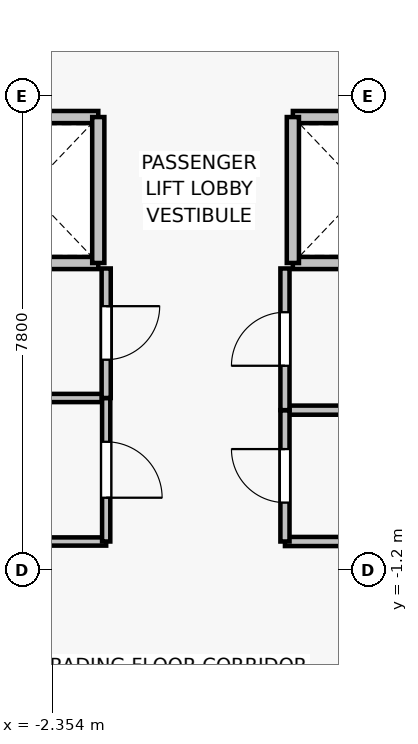
"""IFC4 building model, lengths in metres.
Left out: names, types, materials, properties, quantities, classifications, styles, units other than length and angle.
Written with IfcOpenShell. Run it as: python <this file> out.ifc"""

import sys

from ifc_helpers import new_model, si_unit, direction, frame, frame_2d, origin, place, context, subcontext, project, spatial, rectangle, extrude, source, transform, mapped, element, fill, save


model = new_model("IFC4")
c1 = context("Model", 3, precision=1e-05, world=origin(), true_north=direction((0.0, 1.0)))
c2 = subcontext(c1, "Body", "Model", "MODEL_VIEW")
j1 = project(units=[si_unit("LENGTHUNIT", "METRE"), si_unit("PLANEANGLEUNIT", "RADIAN")], contexts=[c1])
p1 = place(None, origin())
s1 = spatial("IfcSite", under=j1, at=p1, CompositionType="ELEMENT")
p2 = place(p1, origin())
s2 = spatial("IfcBuilding", under=s1, at=p2, CompositionType="ELEMENT")
p3 = place(p2, frame((0.0, 0.0, 47.2)))
s3 = spatial("IfcBuildingStorey", under=s2, at=p3, CompositionType="ELEMENT", Elevation=47.2)
for number, where, z_axis, x_axis in (
    (1, (-1.6, 3.85, 0.0), (0.0, 0.0, 1.0), (-1.0, 0.0, 0.0)),
    (2, (-3.9, 6.25, 0.0), (0.0, 0.0, 1.0), (1.0, 0.0, 0.0)),
):
    element("IfcWall", number, at=place(p3, frame(where, z_axis=z_axis, x_axis=x_axis)), inside=s3, PredefinedType="SOLIDWALL", context=c2, shape_type="SweptSolid", body=[
        extrude(rectangle(XDim=2.3, YDim=0.2, at=frame_2d((1.15, 0.0))), origin(), (0.0, 0.0, 1.0), 3.075),
    ])
p4 = place(p3, frame((-1.6, 6.25, 0.0), z_axis=(0.0, 0.0, 1.0), x_axis=(0.0, -1.0, 0.0)))
e3 = element("IfcWall", 3, at=p4, inside=s3, PredefinedType="SOLIDWALL", context=c2, shape_type="SweptSolid", body=[
    extrude(rectangle(XDim=2.4, YDim=0.2, at=frame_2d((1.2, 0.0))), origin(), (0.0, 0.0, 1.0), 3.075),
])
for number, where, z_axis, x_axis in (
    (4, (3.9, 3.85, 0.0), (0.0, 0.0, 1.0), (-1.0, 0.0, 0.0)),
    (5, (1.6, 6.25, 0.0), (0.0, 0.0, 1.0), (1.0, 0.0, 0.0)),
):
    element("IfcWall", number, at=place(p3, frame(where, z_axis=z_axis, x_axis=x_axis)), inside=s3, PredefinedType="SOLIDWALL", context=c2, shape_type="SweptSolid", body=[
        extrude(rectangle(XDim=2.3, YDim=0.2, at=frame_2d((1.15, 0.0))), origin(), (0.0, 0.0, 1.0), 3.075),
    ])
p5 = place(p3, frame((1.6, 3.85, 0.0), z_axis=(0.0, 0.0, 1.0), x_axis=(0.0, 1.0, 0.0)))
e6 = element("IfcWall", 6, at=p5, inside=s3, PredefinedType="SOLIDWALL", context=c2, shape_type="SweptSolid", body=[
    extrude(rectangle(XDim=2.4, YDim=0.2, at=frame_2d((1.2, 0.0))), origin(), (0.0, 0.0, 1.0), 3.075),
])
for number, where, z_axis, x_axis in (
    (7, (-1.47, -0.73, 0.0), (0.0, 0.0, 1.0), (-1.0, 0.0, 0.0)),
    (8, (-3.47, 1.63, 0.0), (0.0, 0.0, 1.0), (1.0, 0.0, 0.0)),
):
    element("IfcWall", number, at=place(p3, frame(where, z_axis=z_axis, x_axis=x_axis)), inside=s3, PredefinedType="PARTITIONING", context=c2, shape_type="SweptSolid", body=[
        extrude(rectangle(XDim=2.0, YDim=0.135, at=frame_2d((1.0, 0.0))), origin(), (0.0, 0.0, 1.0), 3.075),
    ])
p6 = place(p3, frame((-1.47, 1.63, 0.0), z_axis=(0.0, 0.0, 1.0), x_axis=(0.0, -1.0, 0.0)))
e9 = element("IfcWall", 9, at=p6, inside=s3, PredefinedType="PARTITIONING", context=c2, shape_type="SweptSolid", body=[
    extrude(rectangle(XDim=2.36, YDim=0.135, at=frame_2d((1.18, 0.0))), origin(), (0.0, 0.0, 1.0), 3.075),
])
p7 = place(p6, frame((0.72, 0.0, 0.0)))
e10 = element("IfcOpeningElement", 10, at=p7, cuts=e9, PredefinedType="OPENING", context=c2, shape_type="SweptSolid", body=[
    extrude(rectangle(XDim=0.92, YDim=2.1, at=frame_2d((0.46, 1.05))), frame((0.0, 0.077, 0.0), z_axis=(0.0, -1.0, 0.0), x_axis=(1.0, 0.0, 0.0)), (0.0, 0.0, 1.0), 0.155),
])
p8 = place(p3, frame((-1.47, 3.76, 0.0), z_axis=(0.0, 0.0, 1.0), x_axis=(0.0, -1.0, 0.0)))
e11 = element("IfcWall", 11, at=p8, inside=s3, PredefinedType="PARTITIONING", context=c2, shape_type="SweptSolid", body=[
    extrude(rectangle(XDim=2.13, YDim=0.15, at=frame_2d((1.065, 0.0))), origin(), (0.0, 0.0, 1.0), 3.075),
])
p9 = place(p8, frame((0.62, 0.0, 0.0)))
e12 = element("IfcOpeningElement", 12, at=p9, cuts=e11, PredefinedType="OPENING", context=c2, shape_type="SweptSolid", body=[
    extrude(rectangle(XDim=0.88, YDim=2.1, at=frame_2d((0.44, 1.05))), frame((0.0, 0.085, 0.0), z_axis=(0.0, -1.0, 0.0), x_axis=(1.0, 0.0, 0.0)), (0.0, 0.0, 1.0), 0.17),
])
for number, where, z_axis, x_axis in (
    (13, (3.68, -0.73, 0.0), (0.0, 0.0, 1.0), (-1.0, 0.0, 0.0)),
    (14, (1.47, 1.43, 0.0), (0.0, 0.0, 1.0), (1.0, 0.0, 0.0)),
):
    element("IfcWall", number, at=place(p3, frame(where, z_axis=z_axis, x_axis=x_axis)), inside=s3, PredefinedType="PARTITIONING", context=c2, shape_type="SweptSolid", body=[
        extrude(rectangle(XDim=2.21, YDim=0.15, at=frame_2d((1.105, 0.0))), origin(), (0.0, 0.0, 1.0), 3.075),
    ])
p10 = place(p3, frame((1.47, -0.73, 0.0), z_axis=(0.0, 0.0, 1.0), x_axis=(0.0, 1.0, 0.0)))
e15 = element("IfcWall", 15, at=p10, inside=s3, PredefinedType="PARTITIONING", context=c2, shape_type="SweptSolid", body=[
    extrude(rectangle(XDim=2.16, YDim=0.15, at=frame_2d((1.08, 0.0))), origin(), (0.0, 0.0, 1.0), 3.075),
])
p11 = place(p10, frame((0.64, 0.0, 0.0)))
e16 = element("IfcOpeningElement", 16, at=p11, cuts=e15, PredefinedType="OPENING", context=c2, shape_type="SweptSolid", body=[
    extrude(rectangle(XDim=0.88, YDim=2.1, at=frame_2d((0.44, 1.05))), frame((0.0, 0.085, 0.0), z_axis=(0.0, -1.0, 0.0), x_axis=(1.0, 0.0, 0.0)), (0.0, 0.0, 1.0), 0.17),
])
p12 = place(p3, frame((1.47, 1.43, 0.0), z_axis=(0.0, 0.0, 1.0), x_axis=(0.0, 1.0, 0.0)))
e17 = element("IfcWall", 17, at=p12, inside=s3, PredefinedType="PARTITIONING", context=c2, shape_type="SweptSolid", body=[
    extrude(rectangle(XDim=2.33, YDim=0.15, at=frame_2d((1.165, 0.0))), origin(), (0.0, 0.0, 1.0), 3.075),
])
p13 = place(p12, frame((0.73, 0.0, 0.0)))
e18 = element("IfcOpeningElement", 18, at=p13, cuts=e17, PredefinedType="OPENING", context=c2, shape_type="SweptSolid", body=[
    extrude(rectangle(XDim=0.88, YDim=2.15, at=frame_2d((0.44, 1.075))), frame((0.0, 0.085, 0.0), z_axis=(0.0, -1.0, 0.0), x_axis=(1.0, 0.0, 0.0)), (0.0, 0.0, 1.0), 0.17),
])
m1 = source(origin(), c2, "Body", "SweptSolid", [
    extrude(rectangle(XDim=0.92, YDim=2.1, at=frame_2d((0.46, 1.05))), frame((0.0, 0.025, 0.0), z_axis=(0.0, -1.0, 0.0), x_axis=(1.0, 0.0, 0.0)), (0.0, 0.0, 1.0), 0.05),
])
p14 = place(p7, origin())
e19 = element("IfcDoor", 19, at=p14, inside=s3, OperationType="SINGLE_SWING_RIGHT", PredefinedType="DOOR", context=c2, shape_type="MappedRepresentation", body=[
    mapped(m1, transform((0.0, 0.0, 0.0), x_axis=(1.0, 0.0, 0.0), y_axis=(0.0, 1.0, 0.0), z_axis=(0.0, 0.0, 1.0), scale=1.0)),
])
fill(e10, e19)
m2 = source(origin(), c2, "Body", "SweptSolid", [
    extrude(rectangle(XDim=0.88, YDim=2.1, at=frame_2d((0.44, 1.05))), frame((0.0, 0.025, 0.0), z_axis=(0.0, -1.0, 0.0), x_axis=(1.0, 0.0, 0.0)), (0.0, 0.0, 1.0), 0.05),
])
p15 = place(p9, origin())
e20 = element("IfcDoor", 20, at=p15, inside=s3, OperationType="SINGLE_SWING_LEFT", PredefinedType="DOOR", context=c2, shape_type="MappedRepresentation", body=[
    mapped(m2, transform((0.0, 0.0, 0.0), x_axis=(1.0, 0.0, 0.0), y_axis=(0.0, 1.0, 0.0), z_axis=(0.0, 0.0, 1.0), scale=1.0)),
])
fill(e12, e20)
p16 = place(p11, origin())
e21 = element("IfcDoor", 21, at=p16, inside=s3, OperationType="SINGLE_SWING_RIGHT", PredefinedType="DOOR", context=c2, shape_type="MappedRepresentation", body=[
    mapped(m2, transform((0.0, 0.0, 0.0), x_axis=(1.0, 0.0, 0.0), y_axis=(0.0, 1.0, 0.0), z_axis=(0.0, 0.0, 1.0), scale=1.0)),
])
fill(e16, e21)
m3 = source(origin(), c2, "Body", "SweptSolid", [
    extrude(rectangle(XDim=0.88, YDim=2.15, at=frame_2d((0.44, 1.075))), frame((0.0, 0.025, 0.0), z_axis=(0.0, -1.0, 0.0), x_axis=(1.0, 0.0, 0.0)), (0.0, 0.0, 1.0), 0.05),
])
p17 = place(p13, origin())
e22 = element("IfcDoor", 22, at=p17, inside=s3, OperationType="SINGLE_SWING_LEFT", PredefinedType="DOOR", context=c2, shape_type="MappedRepresentation", body=[
    mapped(m3, transform((0.0, 0.0, 0.0), x_axis=(1.0, 0.0, 0.0), y_axis=(0.0, 1.0, 0.0), z_axis=(0.0, 0.0, 1.0), scale=1.0)),
])
fill(e18, e22)
save(model, sys.argv[1])
